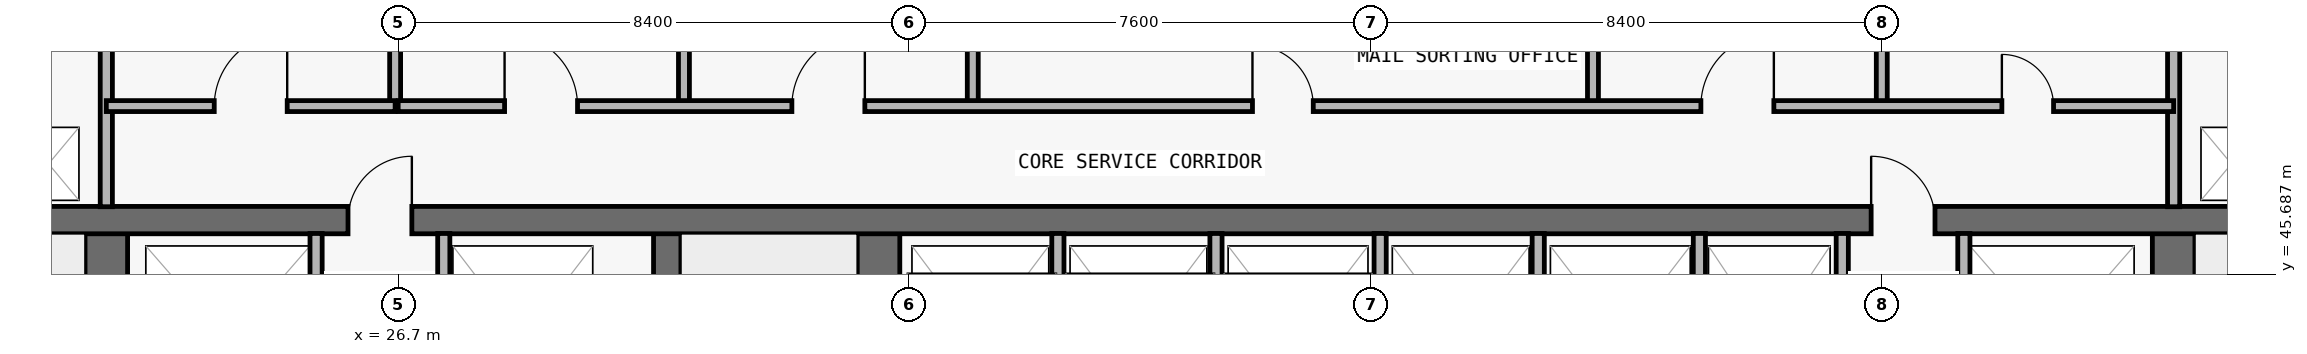
"""IFC4 building model, lengths in metres.
Left out: names, types, materials, properties, quantities, classifications, styles, units other than length and angle.
Written with IfcOpenShell. Run it as: python <this file> out.ifc"""

import sys

from ifc_helpers import new_model, si_unit, direction, frame, frame_2d, origin, place, context, subcontext, project, spatial, rectangle, extrude, element, fill, save


model = new_model("IFC4")
c1 = context("Model", 3, precision=1e-05, world=origin(), true_north=direction((0.0, 1.0)))
c2 = subcontext(c1, "Body", "Model", "MODEL_VIEW")
j1 = project(units=[si_unit("LENGTHUNIT", "METRE"), si_unit("PLANEANGLEUNIT", "RADIAN")], contexts=[c1])
p1 = place(None, origin())
s1 = spatial("IfcSite", under=j1, at=p1, CompositionType="ELEMENT")
p2 = place(p1, origin())
s2 = spatial("IfcBuilding", under=s1, at=p2, CompositionType="ELEMENT")
p3 = place(p2, frame((0.0, 0.0, 66.3)))
s3 = spatial("IfcBuildingStorey", under=s2, at=p3, CompositionType="ELEMENT", Elevation=66.3)
p4 = place(p3, frame((21.9, 36.9, 0.0), z_axis=(0.0, 0.0, 1.0), x_axis=(0.0, 1.0, 0.0)))
e1 = element("IfcWall", 1, at=p4, inside=s3, PredefinedType="SHEAR", context=c2, shape_type="SweptSolid", body=[
    extrude(rectangle(XDim=9.675, YDim=0.7, at=frame_2d((4.837, 0.0))), origin(), (0.0, 0.0, 1.0), 3.05),
])
p5 = place(p4, frame((0.65, 0.0, 0.0)))
e2 = element("IfcOpeningElement", 2, at=p5, cuts=e1, PredefinedType="OPENING", context=c2, shape_type="SweptSolid", body=[
    extrude(rectangle(XDim=1.1, YDim=2.15, at=frame_2d((0.55, 1.075))), frame((0.0, 0.36, 0.0), z_axis=(0.0, -1.0, 0.0), x_axis=(1.0, 0.0, 0.0)), (0.0, 0.0, 1.0), 0.72),
])
p6 = place(p3, frame((55.9, 36.9, 0.0), z_axis=(0.0, 0.0, 1.0), x_axis=(0.0, 1.0, 0.0)))
e3 = element("IfcWall", 3, at=p6, inside=s3, PredefinedType="SHEAR", context=c2, shape_type="SweptSolid", body=[
    extrude(rectangle(XDim=9.675, YDim=0.7, at=frame_2d((4.837, 0.0))), origin(), (0.0, 0.0, 1.0), 3.05),
])
p7 = place(p6, frame((0.65, 0.0, 0.0)))
e4 = element("IfcOpeningElement", 4, at=p7, cuts=e3, PredefinedType="OPENING", context=c2, shape_type="SweptSolid", body=[
    extrude(rectangle(XDim=1.1, YDim=2.15, at=frame_2d((0.55, 1.075))), frame((0.0, 0.36, 0.0), z_axis=(0.0, -1.0, 0.0), x_axis=(1.0, 0.0, 0.0)), (0.0, 0.0, 1.0), 0.72),
])
p8 = place(p3, frame((31.125, 36.9, 0.0), z_axis=(0.0, 0.0, 1.0), x_axis=(0.0, 1.0, 0.0)))
e5 = element("IfcWall", 5, at=p8, inside=s3, PredefinedType="SHEAR", context=c2, shape_type="SweptSolid", body=[
    extrude(rectangle(XDim=9.675, YDim=0.45, at=frame_2d((4.837, 0.0))), origin(), (0.0, 0.0, 1.0), 3.05),
])
p9 = place(p3, frame((34.6, 36.9, 0.0), z_axis=(0.0, 0.0, 1.0), x_axis=(0.0, 1.0, 0.0)))
e6 = element("IfcWall", 6, at=p9, inside=s3, PredefinedType="SHEAR", context=c2, shape_type="SweptSolid", body=[
    extrude(rectangle(XDim=9.675, YDim=0.7, at=frame_2d((4.837, 0.0))), origin(), (0.0, 0.0, 1.0), 3.05),
])
p10 = place(p3, frame((18.2, 46.575, 0.0), z_axis=(0.0, 0.0, 1.0), x_axis=(1.0, 0.0, 0.0)))
e7 = element("IfcWall", 7, at=p10, inside=s3, PredefinedType="SHEAR", context=c2, shape_type="SweptSolid", body=[
    extrude(rectangle(XDim=41.4, YDim=0.45, at=frame_2d((20.7, 0.0))), origin(), (0.0, 0.0, 1.0), 3.05),
])
p11 = place(p10, frame((7.675, 0.0, 0.0)))
e8 = element("IfcOpeningElement", 8, at=p11, cuts=e7, PredefinedType="OPENING", context=c2, shape_type="SweptSolid", body=[
    extrude(rectangle(XDim=1.05, YDim=2.15, at=frame_2d((0.525, 1.075))), frame((0.0, 0.235, 0.0), z_axis=(0.0, -1.0, 0.0), x_axis=(1.0, 0.0, 0.0)), (0.0, 0.0, 1.0), 0.47),
])
p12 = place(p10, frame((32.725, 0.0, 0.0)))
e9 = element("IfcOpeningElement", 9, at=p12, cuts=e7, PredefinedType="OPENING", context=c2, shape_type="SweptSolid", body=[
    extrude(rectangle(XDim=1.05, YDim=2.15, at=frame_2d((0.525, 1.075))), frame((0.0, 0.235, 0.0), z_axis=(0.0, -1.0, 0.0), x_axis=(1.0, 0.0, 0.0)), (0.0, 0.0, 1.0), 0.47),
])
p13 = place(p3, frame((21.9, 46.795, 0.0), z_axis=(0.0, 0.0, 1.0), x_axis=(0.0, 1.0, 0.0)))
e10 = element("IfcWall", 10, at=p13, inside=s3, PredefinedType="PARTITIONING", context=c2, shape_type="SweptSolid", body=[
    extrude(rectangle(XDim=3.06, YDim=0.2, at=frame_2d((1.53, 0.0))), origin(), (0.0, 0.0, 1.0), 3.05),
])
p14 = place(p3, frame((25.35, 43.17, 0.0), z_axis=(0.0, 0.0, 1.0), x_axis=(0.0, 1.0, 0.0)))
e11 = element("IfcWall", 11, at=p14, inside=s3, PredefinedType="PARTITIONING", context=c2, shape_type="SweptSolid", body=[
    extrude(rectangle(XDim=3.185, YDim=0.2, at=frame_2d((1.593, 0.0))), origin(), (0.0, 0.0, 1.0), 3.05),
])
p15 = place(p3, frame((26.65, 48.45, 0.0), z_axis=(0.0, 0.0, 1.0), x_axis=(0.0, 1.0, 0.0)))
e12 = element("IfcWall", 12, at=p15, inside=s3, PredefinedType="PARTITIONING", context=c2, shape_type="SweptSolid", body=[
    extrude(rectangle(XDim=1.405, YDim=0.18, at=frame_2d((0.703, 0.0))), origin(), (0.0, 0.0, 1.0), 3.05),
])
p16 = place(p3, frame((27.45, 43.17, 0.0), z_axis=(0.0, 0.0, 1.0), x_axis=(0.0, 1.0, 0.0)))
e13 = element("IfcWall", 13, at=p16, inside=s3, PredefinedType="PARTITIONING", context=c2, shape_type="SweptSolid", body=[
    extrude(rectangle(XDim=3.185, YDim=0.2, at=frame_2d((1.593, 0.0))), origin(), (0.0, 0.0, 1.0), 3.05),
])
for number, where, z_axis, x_axis in (
    (14, (31.4, 48.45, 0.0), (0.0, 0.0, 1.0), (0.0, 1.0, 0.0)),
    (15, (36.15, 48.45, 0.0), (0.0, 0.0, 1.0), (0.0, 1.0, 0.0)),
):
    element("IfcWall", number, at=place(p3, frame(where, z_axis=z_axis, x_axis=x_axis)), inside=s3, PredefinedType="PARTITIONING", context=c2, shape_type="SweptSolid", body=[
        extrude(rectangle(XDim=1.405, YDim=0.18, at=frame_2d((0.703, 0.0))), origin(), (0.0, 0.0, 1.0), 3.05),
    ])
for number, where, z_axis, x_axis in (
    (16, (37.55, 43.17, 0.0), (0.0, 0.0, 1.0), (0.0, 1.0, 0.0)),
    (17, (40.15, 43.17, 0.0), (0.0, 0.0, 1.0), (0.0, 1.0, 0.0)),
    (18, (42.85, 43.17, 0.0), (0.0, 0.0, 1.0), (0.0, 1.0, 0.0)),
    (19, (45.45, 43.17, 0.0), (0.0, 0.0, 1.0), (0.0, 1.0, 0.0)),
):
    element("IfcWall", number, at=place(p3, frame(where, z_axis=z_axis, x_axis=x_axis)), inside=s3, PredefinedType="PARTITIONING", context=c2, shape_type="SweptSolid", body=[
        extrude(rectangle(XDim=3.185, YDim=0.2, at=frame_2d((1.593, 0.0))), origin(), (0.0, 0.0, 1.0), 3.05),
    ])
p17 = place(p3, frame((46.35, 48.45, 0.0), z_axis=(0.0, 0.0, 1.0), x_axis=(0.0, 1.0, 0.0)))
e20 = element("IfcWall", 20, at=p17, inside=s3, PredefinedType="PARTITIONING", context=c2, shape_type="SweptSolid", body=[
    extrude(rectangle(XDim=1.405, YDim=0.18, at=frame_2d((0.703, 0.0))), origin(), (0.0, 0.0, 1.0), 3.05),
])
for number, where, z_axis, x_axis in (
    (21, (48.1, 43.17, 0.0), (0.0, 0.0, 1.0), (0.0, 1.0, 0.0)),
    (22, (50.45, 43.17, 0.0), (0.0, 0.0, 1.0), (0.0, 1.0, 0.0)),
):
    element("IfcWall", number, at=place(p3, frame(where, z_axis=z_axis, x_axis=x_axis)), inside=s3, PredefinedType="PARTITIONING", context=c2, shape_type="SweptSolid", body=[
        extrude(rectangle(XDim=3.185, YDim=0.2, at=frame_2d((1.593, 0.0))), origin(), (0.0, 0.0, 1.0), 3.05),
    ])
p18 = place(p3, frame((51.1, 48.45, 0.0), z_axis=(0.0, 0.0, 1.0), x_axis=(0.0, 1.0, 0.0)))
e23 = element("IfcWall", 23, at=p18, inside=s3, PredefinedType="PARTITIONING", context=c2, shape_type="SweptSolid", body=[
    extrude(rectangle(XDim=1.405, YDim=0.18, at=frame_2d((0.703, 0.0))), origin(), (0.0, 0.0, 1.0), 3.05),
])
p19 = place(p3, frame((52.45, 43.17, 0.0), z_axis=(0.0, 0.0, 1.0), x_axis=(0.0, 1.0, 0.0)))
e24 = element("IfcWall", 24, at=p19, inside=s3, PredefinedType="PARTITIONING", context=c2, shape_type="SweptSolid", body=[
    extrude(rectangle(XDim=3.185, YDim=0.2, at=frame_2d((1.593, 0.0))), origin(), (0.0, 0.0, 1.0), 3.05),
])
p20 = place(p3, frame((55.9, 46.795, 0.0), z_axis=(0.0, 0.0, 1.0), x_axis=(0.0, 1.0, 0.0)))
e25 = element("IfcWall", 25, at=p20, inside=s3, PredefinedType="PARTITIONING", context=c2, shape_type="SweptSolid", body=[
    extrude(rectangle(XDim=3.06, YDim=0.2, at=frame_2d((1.53, 0.0))), origin(), (0.0, 0.0, 1.0), 3.05),
])
p21 = place(p3, frame((21.9, 48.45, 0.0), z_axis=(0.0, 0.0, 1.0), x_axis=(1.0, 0.0, 0.0)))
e26 = element("IfcWall", 26, at=p21, inside=s3, PredefinedType="PARTITIONING", context=c2, shape_type="SweptSolid", body=[
    extrude(rectangle(XDim=4.75, YDim=0.18, at=frame_2d((2.375, 0.0))), origin(), (0.0, 0.0, 1.0), 3.05),
])
p22 = place(p21, frame((1.775, 0.0, 0.0)))
e27 = element("IfcOpeningElement", 27, at=p22, cuts=e26, PredefinedType="OPENING", context=c2, shape_type="SweptSolid", body=[
    extrude(rectangle(XDim=1.2, YDim=2.2, at=frame_2d((0.6, 1.1))), frame((0.0, 0.1, 0.0), z_axis=(0.0, -1.0, 0.0), x_axis=(1.0, 0.0, 0.0)), (0.0, 0.0, 1.0), 0.2),
])
p23 = place(p3, frame((26.7, 48.45, 0.0), z_axis=(0.0, 0.0, 1.0), x_axis=(1.0, 0.0, 0.0)))
e28 = element("IfcWall", 28, at=p23, inside=s3, PredefinedType="PARTITIONING", context=c2, shape_type="SweptSolid", body=[
    extrude(rectangle(XDim=29.2, YDim=0.18, at=frame_2d((14.6, 0.0))), origin(), (0.0, 0.0, 1.0), 3.05),
])
p24 = place(p23, frame((1.75, 0.0, 0.0)))
e29 = element("IfcOpeningElement", 29, at=p24, cuts=e28, PredefinedType="OPENING", context=c2, shape_type="SweptSolid", body=[
    extrude(rectangle(XDim=1.2, YDim=2.2, at=frame_2d((0.6, 1.1))), frame((0.0, 0.1, 0.0), z_axis=(0.0, -1.0, 0.0), x_axis=(1.0, 0.0, 0.0)), (0.0, 0.0, 1.0), 0.2),
])
p25 = place(p23, frame((6.475, 0.0, 0.0)))
e30 = element("IfcOpeningElement", 30, at=p25, cuts=e28, PredefinedType="OPENING", context=c2, shape_type="SweptSolid", body=[
    extrude(rectangle(XDim=1.2, YDim=2.2, at=frame_2d((0.6, 1.1))), frame((0.0, 0.1, 0.0), z_axis=(0.0, -1.0, 0.0), x_axis=(1.0, 0.0, 0.0)), (0.0, 0.0, 1.0), 0.2),
])
p26 = place(p23, frame((14.05, 0.0, 0.0)))
e31 = element("IfcOpeningElement", 31, at=p26, cuts=e28, PredefinedType="OPENING", context=c2, shape_type="SweptSolid", body=[
    extrude(rectangle(XDim=1.0, YDim=2.2, at=frame_2d((0.5, 1.1))), frame((0.0, 0.1, 0.0), z_axis=(0.0, -1.0, 0.0), x_axis=(1.0, 0.0, 0.0)), (0.0, 0.0, 1.0), 0.2),
])
p27 = place(p23, frame((21.425, 0.0, 0.0)))
e32 = element("IfcOpeningElement", 32, at=p27, cuts=e28, PredefinedType="OPENING", context=c2, shape_type="SweptSolid", body=[
    extrude(rectangle(XDim=1.2, YDim=2.2, at=frame_2d((0.6, 1.1))), frame((0.0, 0.1, 0.0), z_axis=(0.0, -1.0, 0.0), x_axis=(1.0, 0.0, 0.0)), (0.0, 0.0, 1.0), 0.2),
])
p28 = place(p23, frame((26.375, 0.0, 0.0)))
e33 = element("IfcOpeningElement", 33, at=p28, cuts=e28, PredefinedType="OPENING", context=c2, shape_type="SweptSolid", body=[
    extrude(rectangle(XDim=0.85, YDim=2.1, at=frame_2d((0.425, 1.05))), frame((0.0, 0.1, 0.0), z_axis=(0.0, -1.0, 0.0), x_axis=(1.0, 0.0, 0.0)), (0.0, 0.0, 1.0), 0.2),
])
p29 = place(p11, origin())
e34 = element("IfcDoor", 34, at=p29, inside=s3, OperationType="SINGLE_SWING_RIGHT", PredefinedType="DOOR", context=c2, shape_type="SweptSolid", body=[
    extrude(rectangle(XDim=1.05, YDim=2.15, at=frame_2d((0.525, 1.075))), frame((0.0, 0.025, 0.0), z_axis=(0.0, -1.0, 0.0), x_axis=(1.0, 0.0, 0.0)), (0.0, 0.0, 1.0), 0.05),
])
fill(e8, e34)
p30 = place(p12, origin())
e35 = element("IfcDoor", 35, at=p30, inside=s3, OperationType="SINGLE_SWING_LEFT", PredefinedType="DOOR", context=c2, shape_type="SweptSolid", body=[
    extrude(rectangle(XDim=1.05, YDim=2.15, at=frame_2d((0.525, 1.075))), frame((0.0, 0.025, 0.0), z_axis=(0.0, -1.0, 0.0), x_axis=(1.0, 0.0, 0.0)), (0.0, 0.0, 1.0), 0.05),
])
fill(e9, e35)
p31 = place(p22, origin())
e36 = element("IfcDoor", 36, at=p31, inside=s3, OperationType="SINGLE_SWING_RIGHT", PredefinedType="DOOR", context=c2, shape_type="SweptSolid", body=[
    extrude(rectangle(XDim=1.2, YDim=2.2, at=frame_2d((0.6, 1.1))), frame((0.0, 0.025, 0.0), z_axis=(0.0, -1.0, 0.0), x_axis=(1.0, 0.0, 0.0)), (0.0, 0.0, 1.0), 0.05),
])
fill(e27, e36)
p32 = place(p24, origin())
e37 = element("IfcDoor", 37, at=p32, inside=s3, OperationType="SINGLE_SWING_LEFT", PredefinedType="DOOR", context=c2, shape_type="SweptSolid", body=[
    extrude(rectangle(XDim=1.2, YDim=2.2, at=frame_2d((0.6, 1.1))), frame((0.0, 0.025, 0.0), z_axis=(0.0, -1.0, 0.0), x_axis=(1.0, 0.0, 0.0)), (0.0, 0.0, 1.0), 0.05),
])
fill(e29, e37)
p33 = place(p25, origin())
e38 = element("IfcDoor", 38, at=p33, inside=s3, OperationType="SINGLE_SWING_RIGHT", PredefinedType="DOOR", context=c2, shape_type="SweptSolid", body=[
    extrude(rectangle(XDim=1.2, YDim=2.2, at=frame_2d((0.6, 1.1))), frame((0.0, 0.025, 0.0), z_axis=(0.0, -1.0, 0.0), x_axis=(1.0, 0.0, 0.0)), (0.0, 0.0, 1.0), 0.05),
])
fill(e30, e38)
p34 = place(p26, origin())
e39 = element("IfcDoor", 39, at=p34, inside=s3, OperationType="SINGLE_SWING_LEFT", PredefinedType="DOOR", context=c2, shape_type="SweptSolid", body=[
    extrude(rectangle(XDim=1.0, YDim=2.2, at=frame_2d((0.5, 1.1))), frame((0.0, 0.025, 0.0), z_axis=(0.0, -1.0, 0.0), x_axis=(1.0, 0.0, 0.0)), (0.0, 0.0, 1.0), 0.05),
])
fill(e31, e39)
p35 = place(p27, origin())
e40 = element("IfcDoor", 40, at=p35, inside=s3, OperationType="SINGLE_SWING_RIGHT", PredefinedType="DOOR", context=c2, shape_type="SweptSolid", body=[
    extrude(rectangle(XDim=1.2, YDim=2.2, at=frame_2d((0.6, 1.1))), frame((0.0, 0.025, 0.0), z_axis=(0.0, -1.0, 0.0), x_axis=(1.0, 0.0, 0.0)), (0.0, 0.0, 1.0), 0.05),
])
fill(e32, e40)
p36 = place(p28, origin())
e41 = element("IfcDoor", 41, at=p36, inside=s3, OperationType="SINGLE_SWING_LEFT", PredefinedType="DOOR", context=c2, shape_type="SweptSolid", body=[
    extrude(rectangle(XDim=0.85, YDim=2.1, at=frame_2d((0.425, 1.05))), frame((0.0, 0.025, 0.0), z_axis=(0.0, -1.0, 0.0), x_axis=(1.0, 0.0, 0.0)), (0.0, 0.0, 1.0), 0.05),
])
fill(e33, e41)
save(model, sys.argv[1])
